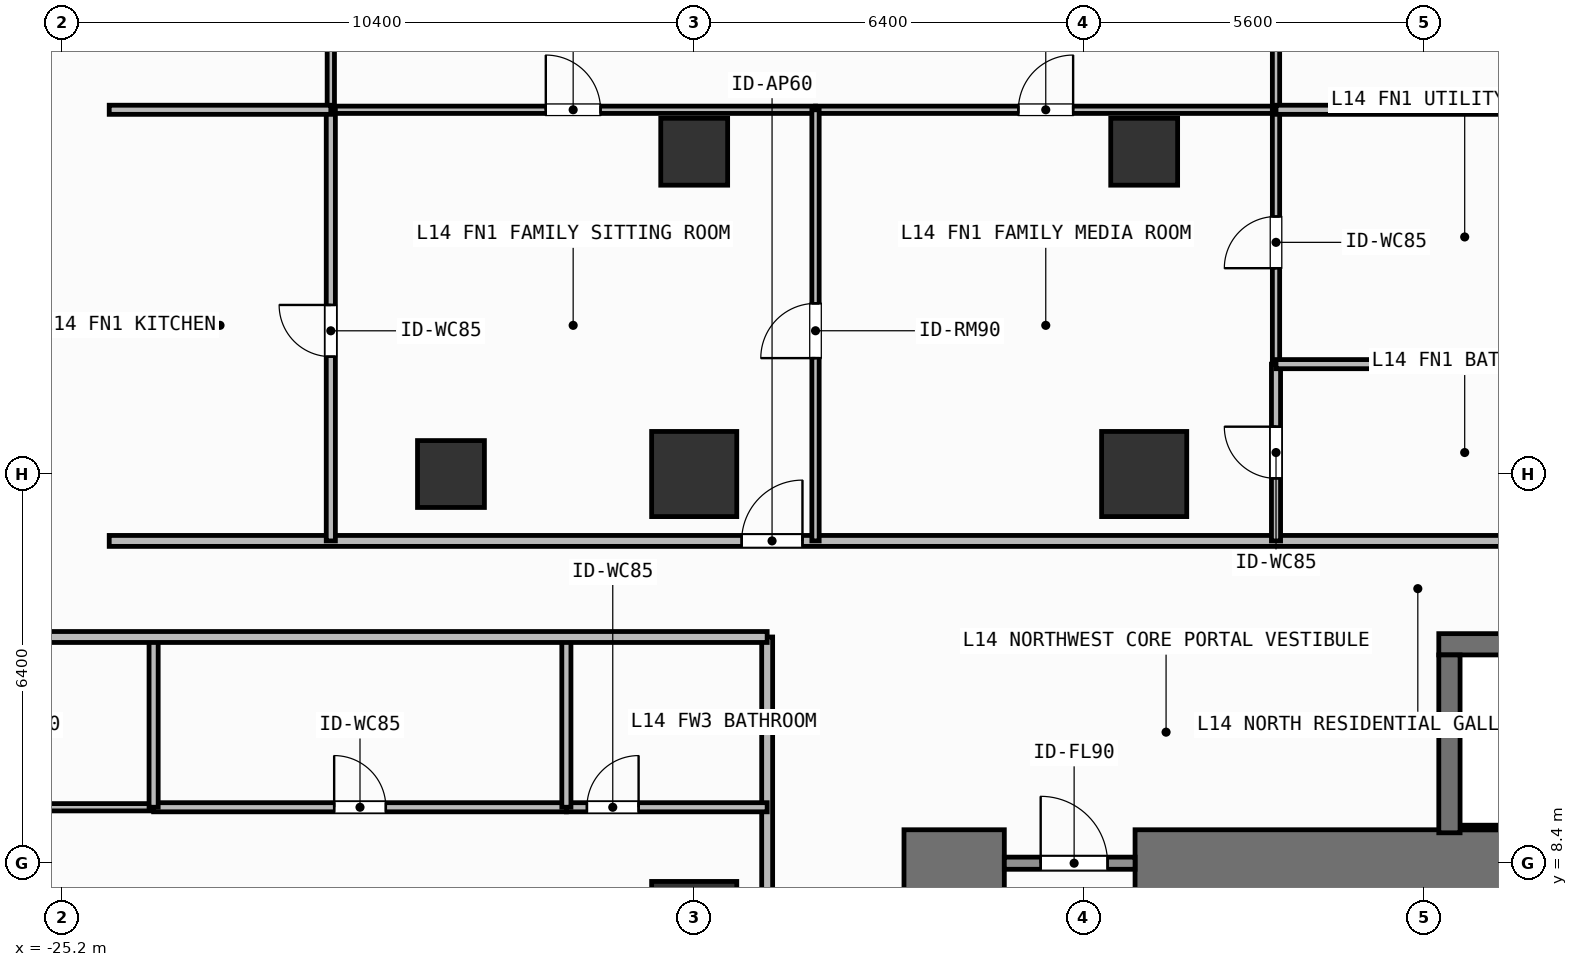
"""IFC4 building model, lengths in metres.
Left out: names, types, materials, properties, quantities, classifications, styles, units other than length and angle.
Written with IfcOpenShell. Run it as: python <this file> out.ifc"""

import sys

from ifc_helpers import new_model, si_unit, direction, frame, frame_2d, origin, origin_2d, place, context, subcontext, project, spatial, rectangle, extrude, element, fill, save


model = new_model("IFC4")
c1 = context("Model", 3, precision=1e-05, world=origin(), true_north=direction((0.0, 1.0)))
c2 = subcontext(c1, "Body", "Model", "MODEL_VIEW")
j1 = project(units=[si_unit("LENGTHUNIT", "METRE"), si_unit("PLANEANGLEUNIT", "RADIAN")], contexts=[c1])
p1 = place(None, origin())
s1 = spatial("IfcSite", under=j1, at=p1, CompositionType="ELEMENT")
p2 = place(p1, origin())
s2 = spatial("IfcBuilding", under=s1, at=p2, CompositionType="ELEMENT")
p3 = place(p2, frame((0.0, 0.0, 54.0)))
s3 = spatial("IfcBuildingStorey", under=s2, at=p3, CompositionType="ELEMENT", Elevation=54.0)
p4 = place(p3, frame((-11.35, 8.4, 0.0), z_axis=(0.0, 0.0, 1.0), x_axis=(1.0, 0.0, 0.0)))
e1 = element("IfcWall", 1, at=p4, inside=s3, PredefinedType="SHEAR", context=c2, shape_type="SweptSolid", body=[
    extrude(rectangle(XDim=1.65, YDim=1.1, at=frame_2d((0.825, 0.0))), origin(), (0.0, 0.0, 1.0), 3.9),
])
p5 = place(p3, frame((-7.55, 8.4, 0.0), z_axis=(0.0, 0.0, 1.0), x_axis=(1.0, 0.0, 0.0)))
e2 = element("IfcWall", 2, at=p5, inside=s3, PredefinedType="SHEAR", context=c2, shape_type="SweptSolid", body=[
    extrude(rectangle(XDim=16.5, YDim=1.1, at=frame_2d((8.25, 0.0))), origin(), (0.0, 0.0, 1.0), 3.9),
])
p6 = place(p3, frame((-2.555, 12.0, 0.0), z_axis=(0.0, 0.0, 1.0), x_axis=(1.0, 0.0, 0.0)))
e3 = element("IfcWall", 3, at=p6, inside=s3, PredefinedType="SHEAR", context=c2, shape_type="SweptSolid", body=[
    extrude(rectangle(XDim=7.31, YDim=0.35, at=frame_2d((3.655, 0.0))), origin(), (0.0, 0.0, 1.0), 3.9),
])
p7 = place(p3, frame((-2.2, 8.988, 0.0), z_axis=(0.0, 0.0, 1.0), x_axis=(1.0, 0.0, 0.0)))
e4 = element("IfcWall", 4, at=p7, inside=s3, PredefinedType="SHEAR", context=c2, shape_type="SweptSolid", body=[
    extrude(rectangle(XDim=6.6, YDim=0.075, at=frame_2d((3.3, 0.0))), origin(), (0.0, 0.0, 1.0), 3.9),
])
p8 = place(p3, frame((-2.38, 8.9, 0.0), z_axis=(0.0, 0.0, 1.0), x_axis=(0.0, 1.0, 0.0)))
e5 = element("IfcWall", 5, at=p8, inside=s3, PredefinedType="SHEAR", context=c2, shape_type="SweptSolid", body=[
    extrude(rectangle(XDim=2.925, YDim=0.35, at=frame_2d((1.462, 0.0))), origin(), (0.0, 0.0, 1.0), 3.9),
])
for number, where, z_axis, x_axis in (
    (6, (-14.8, 14.8, 0.0), (0.0, 0.0, 1.0), (1.0, 0.0, 0.0)),
    (7, (-7.4, 14.8, 0.0), (0.0, 0.0, 1.0), (1.0, 0.0, 0.0)),
    (8, (-14.8, 7.4, 0.0), (0.0, 0.0, 1.0), (1.0, 0.0, 0.0)),
):
    element("IfcColumn", number, at=place(p3, frame(where, z_axis=z_axis, x_axis=x_axis)), inside=s3, PredefinedType="COLUMN", context=c2, shape_type="SweptSolid", body=[
        extrude(rectangle(XDim=1.4, YDim=1.4, at=origin_2d()), origin(), (0.0, 0.0, 1.0), 3.9),
    ])
for number, where, z_axis, x_axis in (
    (9, (-18.8, 14.8, 0.0), (0.0, 0.0, 1.0), (1.0, 0.0, 0.0)),
    (10, (-14.8, 20.1, 0.0), (0.0, 0.0, 1.0), (1.0, 0.0, 0.0)),
    (11, (-7.4, 20.1, 0.0), (0.0, 0.0, 1.0), (1.0, 0.0, 0.0)),
):
    element("IfcColumn", number, at=place(p3, frame(where, z_axis=z_axis, x_axis=x_axis)), inside=s3, PredefinedType="COLUMN", context=c2, shape_type="SweptSolid", body=[
        extrude(rectangle(XDim=1.1, YDim=1.1, at=origin_2d()), origin(), (0.0, 0.0, 1.0), 3.9),
    ])
p9 = place(p3, frame((-27.992, 20.508, 0.0), z_axis=(0.0, 0.0, 1.0), x_axis=(0.707106781187, 0.707106781187, 0.0)))
e12 = element("IfcWall", 12, at=p9, inside=s3, PredefinedType="SOLIDWALL", context=c2, shape_type="SweptSolid", body=[
    extrude(rectangle(XDim=6.484, YDim=0.24, at=frame_2d((3.242, 0.0))), origin(), (0.0, 0.0, 1.0), 3.68),
])
p10 = place(p9, frame((2.492, 0.0, 0.8)))
e13 = element("IfcOpeningElement", 13, at=p10, cuts=e12, PredefinedType="OPENING", context=c2, shape_type="SweptSolid", body=[
    extrude(rectangle(XDim=1.5, YDim=1.85, at=frame_2d((0.75, 0.925))), frame((0.0, 0.13, 0.0), z_axis=(0.0, -1.0, 0.0), x_axis=(1.0, 0.0, 0.0)), (0.0, 0.0, 1.0), 0.26),
])
p11 = place(p3, frame((-9.7, 8.4, 0.0), z_axis=(0.0, 0.0, 1.0), x_axis=(1.0, 0.0, 0.0)))
e14 = element("IfcWall", 14, at=p11, inside=s3, PredefinedType="SOLIDWALL", context=c2, shape_type="SweptSolid", body=[
    extrude(rectangle(XDim=2.15, YDim=0.2, at=frame_2d((1.075, 0.0))), origin(), (0.0, 0.0, 1.0), 2.72),
])
p12 = place(p11, frame((0.598, 0.0, 0.0)))
e15 = element("IfcOpeningElement", 15, at=p12, cuts=e14, PredefinedType="OPENING", context=c2, shape_type="SweptSolid", body=[
    extrude(rectangle(XDim=1.1, YDim=2.15, at=frame_2d((0.55, 1.075))), frame((0.0, 0.11, 0.0), z_axis=(0.0, -1.0, 0.0), x_axis=(1.0, 0.0, 0.0)), (0.0, 0.0, 1.0), 0.22),
])
p13 = place(p3, frame((-24.42, 13.7, 0.0), z_axis=(0.0, 0.0, 1.0), x_axis=(1.0, 0.0, 0.0)))
e16 = element("IfcWall", 16, at=p13, inside=s3, PredefinedType="PARTITIONING", context=c2, shape_type="SweptSolid", body=[
    extrude(rectangle(XDim=25.394, YDim=0.18, at=frame_2d((12.697, 0.0))), origin(), (0.0, 0.0, 1.0), 3.68),
])
p14 = place(p13, frame((10.4, 0.0, 0.0)))
e17 = element("IfcOpeningElement", 17, at=p14, cuts=e16, PredefinedType="OPENING", context=c2, shape_type="SweptSolid", body=[
    extrude(rectangle(XDim=1.0, YDim=2.2, at=frame_2d((0.5, 1.1))), frame((0.0, 0.1, 0.0), z_axis=(0.0, -1.0, 0.0), x_axis=(1.0, 0.0, 0.0)), (0.0, 0.0, 1.0), 0.2),
])
p15 = place(p3, frame((-20.776, 20.79, 0.0), z_axis=(0.0, 0.0, 1.0), x_axis=(1.0, 0.0, 0.0)))
e18 = element("IfcWall", 18, at=p15, inside=s3, PredefinedType="PARTITIONING", context=c2, shape_type="SweptSolid", body=[
    extrude(rectangle(XDim=7.971, YDim=0.12, at=frame_2d((3.985, 0.0))), origin(), (0.0, 0.0, 1.0), 3.68),
])
p16 = place(p15, frame((3.535, 0.0, 0.0)))
e19 = element("IfcOpeningElement", 19, at=p16, cuts=e18, PredefinedType="OPENING", context=c2, shape_type="SweptSolid", body=[
    extrude(rectangle(XDim=0.9, YDim=2.1, at=frame_2d((0.45, 1.05))), frame((0.0, 0.07, 0.0), z_axis=(0.0, -1.0, 0.0), x_axis=(1.0, 0.0, 0.0)), (0.0, 0.0, 1.0), 0.14),
])
p17 = place(p3, frame((-12.805, 20.79, 0.0), z_axis=(0.0, 0.0, 1.0), x_axis=(1.0, 0.0, 0.0)))
e20 = element("IfcWall", 20, at=p17, inside=s3, PredefinedType="PARTITIONING", context=c2, shape_type="SweptSolid", body=[
    extrude(rectangle(XDim=7.573, YDim=0.12, at=frame_2d((3.787, 0.0))), origin(), (0.0, 0.0, 1.0), 3.68),
])
p18 = place(p17, frame((3.336, 0.0, 0.0)))
e21 = element("IfcOpeningElement", 21, at=p18, cuts=e20, PredefinedType="OPENING", context=c2, shape_type="SweptSolid", body=[
    extrude(rectangle(XDim=0.9, YDim=2.1, at=frame_2d((0.45, 1.05))), frame((0.0, 0.07, 0.0), z_axis=(0.0, -1.0, 0.0), x_axis=(1.0, 0.0, 0.0)), (0.0, 0.0, 1.0), 0.14),
])
p19 = place(p3, frame((-12.805, 13.7, 0.0), z_axis=(0.0, 0.0, 1.0), x_axis=(0.0, 1.0, 0.0)))
e22 = element("IfcWall", 22, at=p19, inside=s3, PredefinedType="PARTITIONING", context=c2, shape_type="SweptSolid", body=[
    extrude(rectangle(XDim=7.09, YDim=0.12, at=frame_2d((3.545, 0.0))), origin(), (0.0, 0.0, 1.0), 3.68),
])
p20 = place(p19, frame((3.006, 0.0, 0.0)))
e23 = element("IfcOpeningElement", 23, at=p20, cuts=e22, PredefinedType="OPENING", context=c2, shape_type="SweptSolid", body=[
    extrude(rectangle(XDim=0.9, YDim=2.1, at=frame_2d((0.45, 1.05))), frame((0.0, 0.07, 0.0), z_axis=(0.0, -1.0, 0.0), x_axis=(1.0, 0.0, 0.0)), (0.0, 0.0, 1.0), 0.14),
])
p21 = place(p3, frame((-20.776, 13.7, 0.0), z_axis=(0.0, 0.0, 1.0), x_axis=(0.0, 1.0, 0.0)))
e24 = element("IfcWall", 24, at=p21, inside=s3, PredefinedType="PARTITIONING", context=c2, shape_type="SweptSolid", body=[
    extrude(rectangle(XDim=7.09, YDim=0.15, at=frame_2d((3.545, 0.0))), origin(), (0.0, 0.0, 1.0), 3.68),
])
p22 = place(p21, frame((3.03, 0.0, 0.0)))
e25 = element("IfcOpeningElement", 25, at=p22, cuts=e24, PredefinedType="OPENING", context=c2, shape_type="SweptSolid", body=[
    extrude(rectangle(XDim=0.85, YDim=2.1, at=frame_2d((0.425, 1.05))), frame((0.0, 0.085, 0.0), z_axis=(0.0, -1.0, 0.0), x_axis=(1.0, 0.0, 0.0)), (0.0, 0.0, 1.0), 0.17),
])
p23 = place(p3, frame((-20.776, 20.79, 0.0), z_axis=(0.0, 0.0, 1.0), x_axis=(0.0, 1.0, 0.0)))
e26 = element("IfcWall", 26, at=p23, inside=s3, PredefinedType="PARTITIONING", context=c2, shape_type="SweptSolid", body=[
    extrude(rectangle(XDim=4.24, YDim=0.12, at=frame_2d((2.12, 0.0))), origin(), (0.0, 0.0, 1.0), 3.68),
])
p24 = place(p23, frame((1.581, 0.0, 0.0)))
e27 = element("IfcOpeningElement", 27, at=p24, cuts=e26, PredefinedType="OPENING", context=c2, shape_type="SweptSolid", body=[
    extrude(rectangle(XDim=0.9, YDim=2.1, at=frame_2d((0.45, 1.05))), frame((0.0, 0.07, 0.0), z_axis=(0.0, -1.0, 0.0), x_axis=(1.0, 0.0, 0.0)), (0.0, 0.0, 1.0), 0.14),
])
p25 = place(p3, frame((-5.232, 13.7, 0.0), z_axis=(0.0, 0.0, 1.0), x_axis=(0.0, 1.0, 0.0)))
e28 = element("IfcWall", 28, at=p25, inside=s3, PredefinedType="PARTITIONING", context=c2, shape_type="SweptSolid", body=[
    extrude(rectangle(XDim=2.907, YDim=0.15, at=frame_2d((1.454, 0.0))), origin(), (0.0, 0.0, 1.0), 3.68),
])
p26 = place(p25, frame((1.029, 0.0, 0.0)))
e29 = element("IfcOpeningElement", 29, at=p26, cuts=e28, PredefinedType="OPENING", context=c2, shape_type="SweptSolid", body=[
    extrude(rectangle(XDim=0.85, YDim=2.1, at=frame_2d((0.425, 1.05))), frame((0.0, 0.085, 0.0), z_axis=(0.0, -1.0, 0.0), x_axis=(1.0, 0.0, 0.0)), (0.0, 0.0, 1.0), 0.17),
])
p27 = place(p3, frame((-5.232, 16.607, 0.0), z_axis=(0.0, 0.0, 1.0), x_axis=(0.0, 1.0, 0.0)))
e30 = element("IfcWall", 30, at=p27, inside=s3, PredefinedType="PARTITIONING", context=c2, shape_type="SweptSolid", body=[
    extrude(rectangle(XDim=4.183, YDim=0.12, at=frame_2d((2.092, 0.0))), origin(), (0.0, 0.0, 1.0), 3.68),
])
p28 = place(p27, frame((1.578, 0.0, 0.0)))
e31 = element("IfcOpeningElement", 31, at=p28, cuts=e30, PredefinedType="OPENING", context=c2, shape_type="SweptSolid", body=[
    extrude(rectangle(XDim=0.85, YDim=2.1, at=frame_2d((0.425, 1.05))), frame((0.0, 0.07, 0.0), z_axis=(0.0, -1.0, 0.0), x_axis=(1.0, 0.0, 0.0)), (0.0, 0.0, 1.0), 0.14),
])
p29 = place(p3, frame((-5.232, 20.79, 0.0), z_axis=(0.0, 0.0, 1.0), x_axis=(0.0, 1.0, 0.0)))
e32 = element("IfcWall", 32, at=p29, inside=s3, PredefinedType="PARTITIONING", context=c2, shape_type="SweptSolid", body=[
    extrude(rectangle(XDim=4.24, YDim=0.12, at=frame_2d((2.12, 0.0))), origin(), (0.0, 0.0, 1.0), 3.68),
])
p30 = place(p29, frame((1.581, 0.0, 0.0)))
e33 = element("IfcOpeningElement", 33, at=p30, cuts=e32, PredefinedType="OPENING", context=c2, shape_type="SweptSolid", body=[
    extrude(rectangle(XDim=0.9, YDim=2.1, at=frame_2d((0.45, 1.05))), frame((0.0, 0.07, 0.0), z_axis=(0.0, -1.0, 0.0), x_axis=(1.0, 0.0, 0.0)), (0.0, 0.0, 1.0), 0.14),
])
p31 = place(p3, frame((-13.6, 4.04, 0.0), z_axis=(0.0, 0.0, 1.0), x_axis=(0.0, 1.0, 0.0)))
e34 = element("IfcWall", 34, at=p31, inside=s3, PredefinedType="PARTITIONING", context=c2, shape_type="SweptSolid", body=[
    extrude(rectangle(XDim=8.08, YDim=0.18, at=frame_2d((4.04, 0.0))), origin(), (0.0, 0.0, 1.0), 3.68),
])
p32 = place(p31, frame((1.583, 0.0, 0.0)))
e35 = element("IfcOpeningElement", 35, at=p32, cuts=e34, PredefinedType="OPENING", context=c2, shape_type="SweptSolid", body=[
    extrude(rectangle(XDim=1.0, YDim=2.2, at=frame_2d((0.5, 1.1))), frame((0.0, 0.1, 0.0), z_axis=(0.0, -1.0, 0.0), x_axis=(1.0, 0.0, 0.0)), (0.0, 0.0, 1.0), 0.2),
])
p33 = place(p3, frame((-23.69, 9.32, 0.0), z_axis=(0.0, 0.0, 1.0), x_axis=(1.0, 0.0, 0.0)))
e36 = element("IfcWall", 36, at=p33, inside=s3, PredefinedType="PARTITIONING", context=c2, shape_type="SweptSolid", body=[
    extrude(rectangle(XDim=6.788, YDim=0.15, at=frame_2d((3.394, 0.0))), origin(), (0.0, 0.0, 1.0), 3.68),
])
p34 = place(p33, frame((2.969, 0.0, 0.0)))
e37 = element("IfcOpeningElement", 37, at=p34, cuts=e36, PredefinedType="OPENING", context=c2, shape_type="SweptSolid", body=[
    extrude(rectangle(XDim=0.85, YDim=2.1, at=frame_2d((0.425, 1.05))), frame((0.0, 0.085, 0.0), z_axis=(0.0, -1.0, 0.0), x_axis=(1.0, 0.0, 0.0)), (0.0, 0.0, 1.0), 0.17),
])
p35 = place(p3, frame((-16.902, 9.32, 0.0), z_axis=(0.0, 0.0, 1.0), x_axis=(1.0, 0.0, 0.0)))
e38 = element("IfcWall", 38, at=p35, inside=s3, PredefinedType="PARTITIONING", context=c2, shape_type="SweptSolid", body=[
    extrude(rectangle(XDim=3.302, YDim=0.15, at=frame_2d((1.651, 0.0))), origin(), (0.0, 0.0, 1.0), 3.68),
])
p36 = place(p35, frame((0.338, 0.0, 0.0)))
e39 = element("IfcOpeningElement", 39, at=p36, cuts=e38, PredefinedType="OPENING", context=c2, shape_type="SweptSolid", body=[
    extrude(rectangle(XDim=0.85, YDim=2.1, at=frame_2d((0.425, 1.05))), frame((0.0, 0.085, 0.0), z_axis=(0.0, -1.0, 0.0), x_axis=(1.0, 0.0, 0.0)), (0.0, 0.0, 1.0), 0.17),
])
p37 = place(p3, frame((-27.93, 9.32, 0.0), z_axis=(0.0, 0.0, 1.0), x_axis=(1.0, 0.0, 0.0)))
e40 = element("IfcWall", 40, at=p37, inside=s3, PredefinedType="PARTITIONING", context=c2, shape_type="SweptSolid", body=[
    extrude(rectangle(XDim=4.24, YDim=0.12, at=frame_2d((2.12, 0.0))), origin(), (0.0, 0.0, 1.0), 3.68),
])
p38 = place(p37, frame((1.581, 0.0, 0.0)))
e41 = element("IfcOpeningElement", 41, at=p38, cuts=e40, PredefinedType="OPENING", context=c2, shape_type="SweptSolid", body=[
    extrude(rectangle(XDim=0.9, YDim=2.1, at=frame_2d((0.45, 1.05))), frame((0.0, 0.07, 0.0), z_axis=(0.0, -1.0, 0.0), x_axis=(1.0, 0.0, 0.0)), (0.0, 0.0, 1.0), 0.14),
])
p39 = place(p3, frame((-24.42, 20.79, 0.0), z_axis=(0.0, 0.0, 1.0), x_axis=(1.0, 0.0, 0.0)))
e42 = element("IfcWall", 42, at=p39, inside=s3, PredefinedType="PARTITIONING", context=c2, shape_type="SweptSolid", body=[
    extrude(rectangle(XDim=3.644, YDim=0.15, at=frame_2d((1.822, 0.0))), origin(), (0.0, 0.0, 1.0), 3.68),
])
for number, where, z_axis, x_axis in (
    (43, (-5.232, 16.607, 0.0), (0.0, 0.0, 1.0), (1.0, 0.0, 0.0)),
    (44, (-5.232, 20.79, 0.0), (0.0, 0.0, 1.0), (1.0, 0.0, 0.0)),
):
    element("IfcWall", number, at=place(p3, frame(where, z_axis=z_axis, x_axis=x_axis)), inside=s3, PredefinedType="PARTITIONING", context=c2, shape_type="SweptSolid", body=[
        extrude(rectangle(XDim=6.206, YDim=0.15, at=frame_2d((3.103, 0.0))), origin(), (0.0, 0.0, 1.0), 3.68),
    ])
for number, where, z_axis, x_axis in (
    (45, (-16.902, 9.32, 0.0), (0.0, 0.0, 1.0), (0.0, 1.0, 0.0)),
    (46, (-23.69, 9.32, 0.0), (0.0, 0.0, 1.0), (0.0, 1.0, 0.0)),
):
    element("IfcWall", number, at=place(p3, frame(where, z_axis=z_axis, x_axis=x_axis)), inside=s3, PredefinedType="PARTITIONING", context=c2, shape_type="SweptSolid", body=[
        extrude(rectangle(XDim=2.8, YDim=0.15, at=frame_2d((1.4, 0.0))), origin(), (0.0, 0.0, 1.0), 3.68),
    ])
p40 = place(p3, frame((-27.93, 12.12, 0.0), z_axis=(0.0, 0.0, 1.0), x_axis=(1.0, 0.0, 0.0)))
e47 = element("IfcWall", 47, at=p40, inside=s3, PredefinedType="PARTITIONING", context=c2, shape_type="SweptSolid", body=[
    extrude(rectangle(XDim=14.33, YDim=0.18, at=frame_2d((7.165, 0.0))), origin(), (0.0, 0.0, 1.0), 3.68),
])
p41 = place(p12, origin())
e48 = element("IfcDoor", 48, at=p41, inside=s3, OperationType="SINGLE_SWING_LEFT", PredefinedType="DOOR", context=c2, shape_type="SweptSolid", body=[
    extrude(rectangle(XDim=1.1, YDim=2.15, at=frame_2d((0.55, 1.075))), frame((0.0, 0.025, 0.0), z_axis=(0.0, -1.0, 0.0), x_axis=(1.0, 0.0, 0.0)), (0.0, 0.0, 1.0), 0.05),
])
fill(e15, e48)
p42 = place(p14, origin())
e49 = element("IfcDoor", 49, at=p42, inside=s3, OperationType="SINGLE_SWING_RIGHT", PredefinedType="DOOR", context=c2, shape_type="SweptSolid", body=[
    extrude(rectangle(XDim=1.0, YDim=2.2, at=frame_2d((0.5, 1.1))), frame((0.0, 0.025, 0.0), z_axis=(0.0, -1.0, 0.0), x_axis=(1.0, 0.0, 0.0)), (0.0, 0.0, 1.0), 0.05),
])
fill(e17, e49)
p43 = place(p16, origin())
e50 = element("IfcDoor", 50, at=p43, inside=s3, OperationType="SINGLE_SWING_LEFT", PredefinedType="DOOR", context=c2, shape_type="SweptSolid", body=[
    extrude(rectangle(XDim=0.9, YDim=2.1, at=frame_2d((0.45, 1.05))), frame((0.0, 0.025, 0.0), z_axis=(0.0, -1.0, 0.0), x_axis=(1.0, 0.0, 0.0)), (0.0, 0.0, 1.0), 0.05),
])
fill(e19, e50)
p44 = place(p18, origin())
e51 = element("IfcDoor", 51, at=p44, inside=s3, OperationType="SINGLE_SWING_RIGHT", PredefinedType="DOOR", context=c2, shape_type="SweptSolid", body=[
    extrude(rectangle(XDim=0.9, YDim=2.1, at=frame_2d((0.45, 1.05))), frame((0.0, 0.025, 0.0), z_axis=(0.0, -1.0, 0.0), x_axis=(1.0, 0.0, 0.0)), (0.0, 0.0, 1.0), 0.05),
])
fill(e21, e51)
p45 = place(p20, origin())
e52 = element("IfcDoor", 52, at=p45, inside=s3, OperationType="SINGLE_SWING_LEFT", PredefinedType="DOOR", context=c2, shape_type="SweptSolid", body=[
    extrude(rectangle(XDim=0.9, YDim=2.1, at=frame_2d((0.45, 1.05))), frame((0.0, 0.025, 0.0), z_axis=(0.0, -1.0, 0.0), x_axis=(1.0, 0.0, 0.0)), (0.0, 0.0, 1.0), 0.05),
])
fill(e23, e52)
p46 = place(p22, origin())
e53 = element("IfcDoor", 53, at=p46, inside=s3, OperationType="SINGLE_SWING_RIGHT", PredefinedType="DOOR", context=c2, shape_type="SweptSolid", body=[
    extrude(rectangle(XDim=0.85, YDim=2.1, at=frame_2d((0.425, 1.05))), frame((0.0, 0.025, 0.0), z_axis=(0.0, -1.0, 0.0), x_axis=(1.0, 0.0, 0.0)), (0.0, 0.0, 1.0), 0.05),
])
fill(e25, e53)
p47 = place(p26, origin())
e54 = element("IfcDoor", 54, at=p47, inside=s3, OperationType="SINGLE_SWING_RIGHT", PredefinedType="DOOR", context=c2, shape_type="SweptSolid", body=[
    extrude(rectangle(XDim=0.85, YDim=2.1, at=frame_2d((0.425, 1.05))), frame((0.0, 0.025, 0.0), z_axis=(0.0, -1.0, 0.0), x_axis=(1.0, 0.0, 0.0)), (0.0, 0.0, 1.0), 0.05),
])
fill(e29, e54)
p48 = place(p28, origin())
e55 = element("IfcDoor", 55, at=p48, inside=s3, OperationType="SINGLE_SWING_LEFT", PredefinedType="DOOR", context=c2, shape_type="SweptSolid", body=[
    extrude(rectangle(XDim=0.85, YDim=2.1, at=frame_2d((0.425, 1.05))), frame((0.0, 0.025, 0.0), z_axis=(0.0, -1.0, 0.0), x_axis=(1.0, 0.0, 0.0)), (0.0, 0.0, 1.0), 0.05),
])
fill(e31, e55)
p49 = place(p34, origin())
e56 = element("IfcDoor", 56, at=p49, inside=s3, OperationType="SINGLE_SWING_LEFT", PredefinedType="DOOR", context=c2, shape_type="SweptSolid", body=[
    extrude(rectangle(XDim=0.85, YDim=2.1, at=frame_2d((0.425, 1.05))), frame((0.0, 0.025, 0.0), z_axis=(0.0, -1.0, 0.0), x_axis=(1.0, 0.0, 0.0)), (0.0, 0.0, 1.0), 0.05),
])
fill(e37, e56)
p50 = place(p36, origin())
e57 = element("IfcDoor", 57, at=p50, inside=s3, OperationType="SINGLE_SWING_RIGHT", PredefinedType="DOOR", context=c2, shape_type="SweptSolid", body=[
    extrude(rectangle(XDim=0.85, YDim=2.1, at=frame_2d((0.425, 1.05))), frame((0.0, 0.025, 0.0), z_axis=(0.0, -1.0, 0.0), x_axis=(1.0, 0.0, 0.0)), (0.0, 0.0, 1.0), 0.05),
])
fill(e39, e57)
save(model, sys.argv[1])
